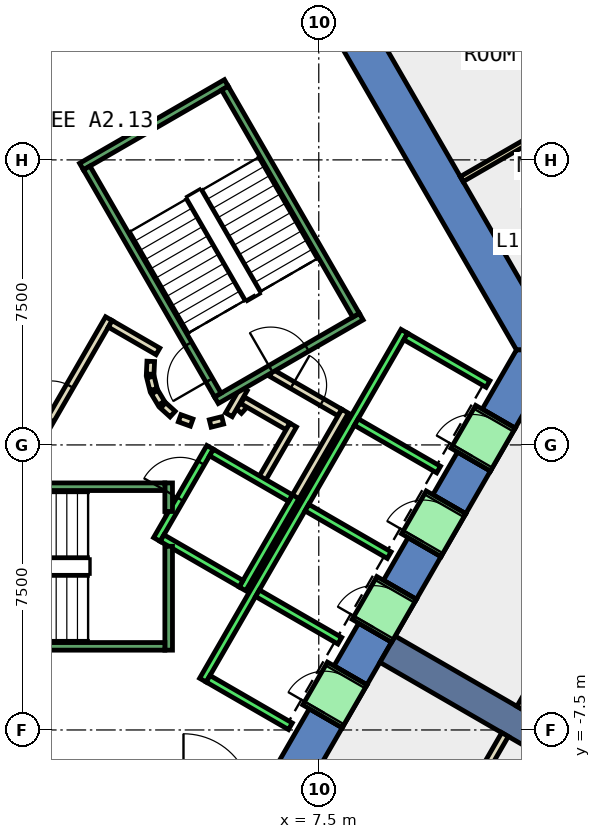
"""IFC4 building model, lengths in metres.
Left out: names, types, materials, properties, quantities, classifications, styles, units other than length and angle.
Written with IfcOpenShell. Run it as: python <this file> out.ifc"""

import sys

from ifc_helpers import new_model, si_unit, direction, frame, frame_2d, origin, place, context, subcontext, project, spatial, polyline, rectangle, outline, extrude, element, fill, save


model = new_model("IFC4")
c1 = context("Model", 3, precision=1e-05, world=origin(), true_north=direction((0.0, 1.0)))
c2 = subcontext(c1, "Body", "Model", "MODEL_VIEW")
j1 = project(units=[si_unit("LENGTHUNIT", "METRE"), si_unit("PLANEANGLEUNIT", "RADIAN")], contexts=[c1])
p1 = place(None, origin())
s1 = spatial("IfcSite", under=j1, at=p1, CompositionType="ELEMENT")
p2 = place(p1, origin())
s2 = spatial("IfcBuilding", under=s1, at=p2, CompositionType="ELEMENT")
p3 = place(p2, frame((0.0, 0.0, 56.0)))
s3 = spatial("IfcBuildingStorey", under=s2, at=p3, CompositionType="ELEMENT", Elevation=56.0)
p4 = place(p3, frame((0.0, 0.0, -0.4)))
e1 = element("IfcWall", 1, at=p4, inside=s3, PredefinedType="SHEAR", context=c2, shape_type="SweptSolid", body=[
    extrude(outline(polyline([(8.517, 11.748), (7.651, 11.248), (12.702, 2.5), (13.856, 2.5), (8.517, 11.748)])), origin(), (0.0, 0.0, 1.0), 4.2),
])
p5 = place(p3, frame((0.0, 0.0, -0.4)))
e2 = element("IfcWall", 2, at=p5, inside=s3, PredefinedType="SHEAR", context=c2, shape_type="SweptSolid", body=[
    extrude(outline(polyline([(8.117, -7.44), (7.252, -6.94), (6.351, -8.5), (6.928, -9.5), (8.117, -7.44)])), origin(), (0.0, 0.0, 1.0), 4.2),
])
p6 = place(p3, frame((0.0, 0.0, -0.4)))
e3 = element("IfcWall", 3, at=p6, inside=s3, PredefinedType="SHEAR", context=c2, shape_type="SweptSolid", body=[
    extrude(outline(polyline([(9.417, -5.189), (8.551, -4.689), (7.902, -5.814), (8.767, -6.314), (9.417, -5.189)])), origin(), (0.0, 0.0, 1.0), 4.2),
])
p7 = place(p3, frame((0.0, 0.0, -0.4)))
e4 = element("IfcWall", 4, at=p7, inside=s3, PredefinedType="SHEAR", context=c2, shape_type="SweptSolid", body=[
    extrude(outline(polyline([(10.717, -2.937), (9.851, -2.437), (9.201, -3.563), (10.067, -4.063), (10.717, -2.937)])), origin(), (0.0, 0.0, 1.0), 4.2),
])
p8 = place(p3, frame((0.0, 0.0, -0.4)))
e5 = element("IfcWall", 5, at=p8, inside=s3, PredefinedType="SHEAR", context=c2, shape_type="SweptSolid", body=[
    extrude(outline(polyline([(12.017, -0.686), (11.151, -0.186), (10.501, -1.311), (11.367, -1.811), (12.017, -0.686)])), origin(), (0.0, 0.0, 1.0), 4.2),
])
p9 = place(p3, frame((0.0, 0.0, -0.4)))
e6 = element("IfcWall", 6, at=p9, inside=s3, PredefinedType="SHEAR", context=c2, shape_type="SweptSolid", body=[
    extrude(outline(polyline([(11.801, 0.94), (12.667, 0.44), (13.856, 2.5), (12.702, 2.5), (11.801, 0.94)])), origin(), (0.0, 0.0, 1.0), 4.2),
])
p10 = place(p3, frame((0.0, 0.0, 3.6)))
e7 = element("IfcWall", 7, at=p10, inside=s3, PredefinedType="SHEAR", context=c2, shape_type="SweptSolid", body=[
    extrude(outline(polyline([(8.767, -6.314), (7.902, -5.814), (7.252, -6.94), (8.117, -7.44), (8.767, -6.314)])), origin(), (0.0, 0.0, 1.0), 0.2),
])
p11 = place(p3, frame((0.0, 0.0, 3.6)))
e8 = element("IfcWall", 8, at=p11, inside=s3, PredefinedType="SHEAR", context=c2, shape_type="SweptSolid", body=[
    extrude(outline(polyline([(10.067, -4.063), (9.201, -3.563), (8.551, -4.689), (9.417, -5.189), (10.067, -4.063)])), origin(), (0.0, 0.0, 1.0), 0.2),
])
p12 = place(p3, frame((0.0, 0.0, 3.6)))
e9 = element("IfcWall", 9, at=p12, inside=s3, PredefinedType="SHEAR", context=c2, shape_type="SweptSolid", body=[
    extrude(outline(polyline([(11.367, -1.811), (10.501, -1.311), (9.851, -2.437), (10.717, -2.937), (11.367, -1.811)])), origin(), (0.0, 0.0, 1.0), 0.2),
])
p13 = place(p3, frame((0.0, 0.0, 3.6)))
e10 = element("IfcWall", 10, at=p13, inside=s3, PredefinedType="SHEAR", context=c2, shape_type="SweptSolid", body=[
    extrude(outline(polyline([(12.667, 0.44), (11.801, 0.94), (11.151, -0.186), (12.017, -0.686), (12.667, 0.44)])), origin(), (0.0, 0.0, 1.0), 0.2),
])
p14 = place(p3, frame((9.31, -5.375, -0.4), z_axis=(0.0, 0.0, 1.0), x_axis=(0.866017533419, -0.500013631625, 0.0)))
e11 = element("IfcWall", 11, at=p14, inside=s3, PredefinedType="SHEAR", context=c2, shape_type="SweptSolid", body=[
    extrude(rectangle(XDim=9.0, YDim=0.8, at=frame_2d((4.5, 0.0))), origin(), (0.0, 0.0, 1.0), 4.2),
])
p15 = place(p3, frame((5.39, 0.898, 0.0), z_axis=(0.0, 0.0, 1.0), x_axis=(0.673828488714, 0.738887791073, 0.0)))
e12 = element("IfcWall", 12, at=p15, inside=s3, PredefinedType="PARTITIONING", context=c2, shape_type="SweptSolid", body=[
    extrude(rectangle(XDim=0.263, YDim=0.2, at=frame_2d((0.131, 0.0))), origin(), (0.0, 0.0, 1.0), 3.8),
])
p16 = place(p3, frame((5.499, 1.172, 0.0), z_axis=(0.0, 0.0, 1.0), x_axis=(0.866333505267, -0.499465972466, 0.0)))
e13 = element("IfcWall", 13, at=p16, inside=s3, PredefinedType="PARTITIONING", context=c2, shape_type="SweptSolid", body=[
    extrude(rectangle(XDim=1.374, YDim=0.2, at=frame_2d((0.687, 0.0))), origin(), (0.0, 0.0, 1.0), 3.8),
])
p17 = place(p3, frame((6.826, 0.522, 0.0), z_axis=(0.0, 0.0, 1.0), x_axis=(-0.500016722714, -0.866015748706, 0.0)))
e14 = element("IfcWall", 14, at=p17, inside=s3, PredefinedType="PARTITIONING", context=c2, shape_type="SweptSolid", body=[
    extrude(rectangle(XDim=1.7, YDim=0.2, at=frame_2d((0.85, 0.0))), origin(), (0.0, 0.0, 1.0), 3.8),
])
p18 = place(p3, frame((6.25, 1.894, 0.0), z_axis=(0.0, 0.0, 1.0), x_axis=(0.866043184279, -0.499969202016, 0.0)))
e15 = element("IfcWall", 15, at=p18, inside=s3, PredefinedType="PARTITIONING", context=c2, shape_type="SweptSolid", body=[
    extrude(rectangle(XDim=2.084, YDim=0.2, at=frame_2d((1.042, 0.0))), origin(), (0.0, 0.0, 1.0), 3.8),
])
p19 = place(p18, frame((0.642, 0.0, 0.0)))
e16 = element("IfcOpeningElement", 16, at=p19, cuts=e15, PredefinedType="OPENING", context=c2, shape_type="SweptSolid", body=[
    extrude(rectangle(XDim=0.9, YDim=2.1, at=frame_2d((0.45, 1.05))), frame((0.0, 0.11, 0.0), z_axis=(0.0, -1.0, 0.0), x_axis=(1.0, 0.0, 0.0)), (0.0, 0.0, 1.0), 0.22),
])
p20 = place(p3, frame((8.192, 0.888, 0.0), z_axis=(0.0, 0.0, 1.0), x_axis=(-0.499940625693, -0.866059680843, 0.0)))
e17 = element("IfcWall", 17, at=p20, inside=s3, PredefinedType="PARTITIONING", context=c2, shape_type="SweptSolid", body=[
    extrude(rectangle(XDim=2.68, YDim=0.2, at=frame_2d((1.34, 0.0))), origin(), (0.0, 0.0, 1.0), 3.8),
])
p21 = place(p3, frame((5.135, 0.793, 0.0), z_axis=(0.0, 0.0, 1.0), x_axis=(0.499526442893, 0.866298639529, 0.0)))
e18 = element("IfcWall", 18, at=p21, inside=s3, PredefinedType="PARTITIONING", context=c2, shape_type="SweptSolid", body=[
    extrude(rectangle(XDim=0.791, YDim=0.2, at=frame_2d((0.396, 0.0))), origin(), (0.0, 0.0, 1.0), 3.8),
])
p22 = place(p3, frame((16.104, 9.79, 0.0), z_axis=(0.0, 0.0, 1.0), x_axis=(-0.866023462144, -0.500003363005, 0.0)))
e19 = element("IfcWall", 19, at=p22, inside=s3, PredefinedType="PARTITIONING", context=c2, shape_type="SweptSolid", body=[
    extrude(rectangle(XDim=5.592, YDim=0.15, at=frame_2d((2.796, 0.0))), origin(), (0.0, 0.0, 1.0), 3.8),
])
p23 = place(p3, frame((-0.52, -1.0, 0.0), z_axis=(0.0, 0.0, 1.0), x_axis=(0.50011622646, 0.865958290007, 0.0)))
e20 = element("IfcWall", 20, at=p23, inside=s3, PredefinedType="PARTITIONING", context=c2, shape_type="SweptSolid", body=[
    extrude(rectangle(XDim=4.991, YDim=0.2, at=frame_2d((2.496, 0.0))), origin(), (0.0, 0.0, 1.0), 3.8),
])
p24 = place(p23, frame((1.945, 0.0, 0.0)))
e21 = element("IfcOpeningElement", 21, at=p24, cuts=e20, PredefinedType="OPENING", context=c2, shape_type="SweptSolid", body=[
    extrude(rectangle(XDim=1.0, YDim=2.1, at=frame_2d((0.5, 1.05))), frame((0.0, 0.11, 0.0), z_axis=(0.0, -1.0, 0.0), x_axis=(1.0, 0.0, 0.0)), (0.0, 0.0, 1.0), 0.22),
])
p25 = place(p3, frame((2.012, 3.186, 0.0), z_axis=(0.0, 0.0, 1.0), x_axis=(0.865891012941, -0.500232699559, 0.0)))
e22 = element("IfcWall", 22, at=p25, inside=s3, PredefinedType="PARTITIONING", context=c2, shape_type="SweptSolid", body=[
    extrude(rectangle(XDim=1.449, YDim=0.2, at=frame_2d((0.725, 0.0))), origin(), (0.0, 0.0, 1.0), 3.8),
])
p26 = place(p3, frame((3.079, 2.199, 0.0), z_axis=(0.0, 0.0, 1.0), x_axis=(-0.047771483479, -0.998858290933, 0.0)))
e23 = element("IfcWall", 23, at=p26, inside=s3, PredefinedType="PARTITIONING", context=c2, shape_type="SweptSolid", body=[
    extrude(rectangle(XDim=0.337, YDim=0.2, at=frame_2d((0.169, 0.0))), origin(), (0.0, 0.0, 1.0), 3.8),
])
p27 = place(p3, frame((3.07, 1.786, 0.0), z_axis=(0.0, 0.0, 1.0), x_axis=(0.242705583207, -0.970099994784, 0.0)))
e24 = element("IfcWall", 24, at=p27, inside=s3, PredefinedType="PARTITIONING", context=c2, shape_type="SweptSolid", body=[
    extrude(rectangle(XDim=0.338, YDim=0.2, at=frame_2d((0.169, 0.0))), origin(), (0.0, 0.0, 1.0), 3.8),
])
for number, where, z_axis, x_axis in (
    (25, (3.182, 1.388, 0.0), (0.0, 0.0, 1.0), (0.512, -0.859, 0.0)),
    (26, (3.404, 1.039, 0.0), (0.0, 0.0, 1.0), (0.74, -0.672, 0.0)),
):
    element("IfcWall", number, at=place(p3, frame(where, z_axis=z_axis, x_axis=x_axis)), inside=s3, PredefinedType="PARTITIONING", context=c2, shape_type="SweptSolid", body=[
        extrude(rectangle(XDim=0.338, YDim=0.2, at=frame_2d((0.169, 0.0))), origin(), (0.0, 0.0, 1.0), 3.8),
    ])
p28 = place(p3, frame((3.838, 0.702, 0.0), z_axis=(0.0, 0.0, 1.0), x_axis=(0.941035081519, -0.338308993895, 0.0)))
e27 = element("IfcWall", 27, at=p28, inside=s3, PredefinedType="PARTITIONING", context=c2, shape_type="SweptSolid", body=[
    extrude(rectangle(XDim=0.337, YDim=0.2, at=frame_2d((0.168, 0.0))), origin(), (0.0, 0.0, 1.0), 3.8),
])
p29 = place(p3, frame((4.644, 0.564, 0.0), z_axis=(0.0, 0.0, 1.0), x_axis=(0.969929076366, 0.243387729394, 0.0)))
e28 = element("IfcWall", 28, at=p29, inside=s3, PredefinedType="PARTITIONING", context=c2, shape_type="SweptSolid", body=[
    extrude(rectangle(XDim=0.337, YDim=0.2, at=frame_2d((0.168, 0.0))), origin(), (0.0, 0.0, 1.0), 3.8),
])
p30 = place(p3, frame((19.257, 4.255, 0.0), z_axis=(0.0, 0.0, 1.0), x_axis=(-0.499978317034, -0.866037922089, 0.0)))
e29 = element("IfcWall", 29, at=p30, inside=s3, PredefinedType="PARTITIONING", context=c2, shape_type="SweptSolid", body=[
    extrude(rectangle(XDim=12.913, YDim=0.2, at=frame_2d((6.456, 0.0))), origin(), (0.0, 0.0, 1.0), 3.8),
])
p31 = place(p3, frame((12.401, -7.621, 0.0), z_axis=(0.0, 0.0, 1.0), x_axis=(-0.499983724212, -0.866034800411, 0.0)))
e30 = element("IfcWall", 30, at=p31, inside=s3, PredefinedType="PARTITIONING", context=c2, shape_type="SweptSolid", body=[
    extrude(rectangle(XDim=9.302, YDim=0.2, at=frame_2d((4.651, 0.0))), origin(), (0.0, 0.0, 1.0), 3.8),
])
p32 = place(p3, frame((3.24, -2.488, 0.0), z_axis=(0.0, 0.0, 1.0), x_axis=(0.49994636267, 0.866056369097, 0.0)))
e31 = element("IfcWall", 31, at=p32, inside=s3, PredefinedType="STANDARD", context=c2, shape_type="SweptSolid", body=[
    extrude(rectangle(XDim=2.8, YDim=0.2, at=frame_2d((1.4, 0.0))), origin(), (0.0, 0.0, 1.0), 3.8),
])
p33 = place(p32, frame((1.225, 0.0, 0.0)))
e32 = element("IfcOpeningElement", 32, at=p33, cuts=e31, PredefinedType="OPENING", context=c2, shape_type="SweptSolid", body=[
    extrude(rectangle(XDim=1.1, YDim=2.1, at=frame_2d((0.55, 1.05))), frame((0.0, 0.11, 0.0), z_axis=(0.0, -1.0, 0.0), x_axis=(1.0, 0.0, 0.0)), (0.0, 0.0, 1.0), 0.22),
])
p34 = place(p3, frame((5.492, -3.788, 0.0), z_axis=(0.0, 0.0, 1.0), x_axis=(0.500011755427, 0.866018616679, 0.0)))
e33 = element("IfcWall", 33, at=p34, inside=s3, PredefinedType="STANDARD", context=c2, shape_type="SweptSolid", body=[
    extrude(rectangle(XDim=2.8, YDim=0.2, at=frame_2d((1.4, 0.0))), origin(), (0.0, 0.0, 1.0), 3.8),
])
p35 = place(p3, frame((3.377, -2.452, 0.0), z_axis=(0.0, 0.0, 1.0), x_axis=(0.865955154139, -0.50012165622, 0.0)))
e34 = element("IfcWall", 34, at=p35, inside=s3, PredefinedType="STANDARD", context=c2, shape_type="SweptSolid", body=[
    extrude(rectangle(XDim=2.4, YDim=0.2, at=frame_2d((1.2, 0.0))), origin(), (0.0, 0.0, 1.0), 3.8),
])
p36 = place(p3, frame((4.677, -0.2, 0.0), z_axis=(0.0, 0.0, 1.0), x_axis=(0.865973769406, -0.500089422704, 0.0)))
e35 = element("IfcWall", 35, at=p36, inside=s3, PredefinedType="STANDARD", context=c2, shape_type="SweptSolid", body=[
    extrude(rectangle(XDim=2.399, YDim=0.2, at=frame_2d((1.2, 0.0))), origin(), (0.0, 0.0, 1.0), 3.8),
])
p37 = place(p3, frame((4.451, -6.19, 0.0), z_axis=(0.0, 0.0, 1.0), x_axis=(0.50000090737, 0.866024879913, 0.0)))
e36 = element("IfcWall", 36, at=p37, inside=s3, PredefinedType="STANDARD", context=c2, shape_type="SweptSolid", body=[
    extrude(rectangle(XDim=10.6, YDim=0.2, at=frame_2d((5.3, 0.0))), origin(), (0.0, 0.0, 1.0), 3.8),
])
for number, where, z_axis, x_axis in (
    (37, (4.588, -6.153, 0.0), (0.0, 0.0, 1.0), (0.866, -0.5, 0.0)),
    (38, (5.888, -3.902, 0.0), (0.0, 0.0, 1.0), (0.866, -0.5, 0.0)),
    (39, (7.188, -1.65, 0.0), (0.0, 0.0, 1.0), (0.866, -0.5, 0.0)),
    (40, (8.488, 0.602, 0.0), (0.0, 0.0, 1.0), (0.866, -0.5, 0.0)),
):
    element("IfcWall", number, at=place(p3, frame(where, z_axis=z_axis, x_axis=x_axis)), inside=s3, PredefinedType="STANDARD", context=c2, shape_type="SweptSolid", body=[
        extrude(rectangle(XDim=2.5, YDim=0.2, at=frame_2d((1.25, 0.0))), origin(), (0.0, 0.0, 1.0), 3.8),
    ])
p38 = place(p3, frame((9.788, 2.853, 0.0), z_axis=(0.0, 0.0, 1.0), x_axis=(0.865998541277, -0.500046524342, 0.0)))
e41 = element("IfcWall", 41, at=p38, inside=s3, PredefinedType="STANDARD", context=c2, shape_type="SweptSolid", body=[
    extrude(rectangle(XDim=2.5, YDim=0.2, at=frame_2d((1.25, 0.0))), origin(), (0.0, 0.0, 1.0), 3.8),
])
p39 = place(p3, frame((7.598, -7.14, 0.0), z_axis=(0.0, 0.0, 1.0), x_axis=(0.500362116554, 0.865816234728, 0.0)))
e42 = element("IfcWall", 42, at=p39, inside=s3, PredefinedType="STANDARD", context=c2, shape_type="SweptSolid", body=[
    extrude(rectangle(XDim=1.299, YDim=1.2, at=frame_2d((0.65, 0.0))), origin(), (0.0, 0.0, 1.0), 2.4),
])
p40 = place(p39, frame((0.1, 0.0, 0.0)))
e43 = element("IfcOpeningElement", 43, at=p40, cuts=e42, PredefinedType="OPENING", context=c2, shape_type="SweptSolid", body=[
    extrude(rectangle(XDim=1.1, YDim=2.3, at=frame_2d((0.55, 1.15))), frame((0.0, 0.61, 0.0), z_axis=(0.0, -1.0, 0.0), x_axis=(1.0, 0.0, 0.0)), (0.0, 0.0, 1.0), 1.22),
])
p41 = place(p3, frame((8.898, -4.889, 0.0), z_axis=(0.0, 0.0, 1.0), x_axis=(0.500036693733, 0.866004217611, 0.0)))
e44 = element("IfcWall", 44, at=p41, inside=s3, PredefinedType="STANDARD", context=c2, shape_type="SweptSolid", body=[
    extrude(rectangle(XDim=1.3, YDim=1.2, at=frame_2d((0.65, 0.0))), origin(), (0.0, 0.0, 1.0), 2.4),
])
p42 = place(p41, frame((0.1, 0.0, 0.0)))
e45 = element("IfcOpeningElement", 45, at=p42, cuts=e44, PredefinedType="OPENING", context=c2, shape_type="SweptSolid", body=[
    extrude(rectangle(XDim=1.1, YDim=2.3, at=frame_2d((0.55, 1.15))), frame((0.0, 0.61, 0.0), z_axis=(0.0, -1.0, 0.0), x_axis=(1.0, 0.0, 0.0)), (0.0, 0.0, 1.0), 1.22),
])
p43 = place(p3, frame((10.198, -2.637, 0.0), z_axis=(0.0, 0.0, 1.0), x_axis=(0.49989585183, 0.866085525409, 0.0)))
e46 = element("IfcWall", 46, at=p43, inside=s3, PredefinedType="STANDARD", context=c2, shape_type="SweptSolid", body=[
    extrude(rectangle(XDim=1.3, YDim=1.2, at=frame_2d((0.65, 0.0))), origin(), (0.0, 0.0, 1.0), 2.4),
])
p44 = place(p43, frame((0.1, 0.0, 0.0)))
e47 = element("IfcOpeningElement", 47, at=p44, cuts=e46, PredefinedType="OPENING", context=c2, shape_type="SweptSolid", body=[
    extrude(rectangle(XDim=1.1, YDim=2.3, at=frame_2d((0.55, 1.15))), frame((0.0, 0.61, 0.0), z_axis=(0.0, -1.0, 0.0), x_axis=(1.0, 0.0, 0.0)), (0.0, 0.0, 1.0), 1.22),
])
p45 = place(p3, frame((11.498, -0.385, 0.0), z_axis=(0.0, 0.0, 1.0), x_axis=(0.500221244143, 0.865897630733, 0.0)))
e48 = element("IfcWall", 48, at=p45, inside=s3, PredefinedType="STANDARD", context=c2, shape_type="SweptSolid", body=[
    extrude(rectangle(XDim=1.299, YDim=1.2, at=frame_2d((0.65, 0.0))), origin(), (0.0, 0.0, 1.0), 2.4),
])
p46 = place(p45, frame((0.1, 0.0, 0.0)))
e49 = element("IfcOpeningElement", 49, at=p46, cuts=e48, PredefinedType="OPENING", context=c2, shape_type="SweptSolid", body=[
    extrude(rectangle(XDim=1.1, YDim=2.3, at=frame_2d((0.55, 1.15))), frame((0.0, 0.61, 0.0), z_axis=(0.0, -1.0, 0.0), x_axis=(1.0, 0.0, 0.0)), (0.0, 0.0, 1.0), 1.22),
])
p47 = place(p3, frame((3.55, -2.667, 0.0), z_axis=(0.0, 0.0, 1.0), x_axis=(0.0, -1.0, 0.0)))
e50 = element("IfcWall", 50, at=p47, inside=s3, PredefinedType="STANDARD", context=c2, shape_type="SweptSolid", body=[
    extrude(rectangle(XDim=2.733, YDim=0.2, at=frame_2d((1.366, 0.0))), origin(), (0.0, 0.0, 1.0), 3.8),
])
p48 = place(p3, frame((3.55, -1.0, 0.0), z_axis=(0.0, 0.0, 1.0), x_axis=(0.0, -1.0, 0.0)))
e51 = element("IfcWall", 51, at=p48, inside=s3, PredefinedType="STANDARD", context=c2, shape_type="SweptSolid", body=[
    extrude(rectangle(XDim=0.751, YDim=0.2, at=frame_2d((0.375, 0.0))), origin(), (0.0, 0.0, 1.0), 3.8),
])
p49 = place(p3, frame((-3.45, -1.1, 0.0), z_axis=(0.0, 0.0, 1.0), x_axis=(1.0, 0.0, 0.0)))
e52 = element("IfcWall", 52, at=p49, inside=s3, PredefinedType="STANDARD", context=c2, shape_type="SweptSolid", body=[
    extrude(rectangle(XDim=6.9, YDim=0.2, at=frame_2d((3.45, 0.0))), origin(), (0.0, 0.0, 1.0), 3.8),
])
p50 = place(p49, frame((0.45, 0.0, 0.0)))
e53 = element("IfcOpeningElement", 53, at=p50, cuts=e52, PredefinedType="OPENING", context=c2, shape_type="SweptSolid", body=[
    extrude(rectangle(XDim=1.1, YDim=2.2, at=frame_2d((0.55, 1.1))), frame((0.0, 0.11, 0.0), z_axis=(0.0, -1.0, 0.0), x_axis=(1.0, 0.0, 0.0)), (0.0, 0.0, 1.0), 0.22),
])
p51 = place(p3, frame((-3.45, -5.3, 0.0), z_axis=(0.0, 0.0, 1.0), x_axis=(1.0, 0.0, 0.0)))
e54 = element("IfcWall", 54, at=p51, inside=s3, PredefinedType="STANDARD", context=c2, shape_type="SweptSolid", body=[
    extrude(rectangle(XDim=6.9, YDim=0.2, at=frame_2d((3.45, 0.0))), origin(), (0.0, 0.0, 1.0), 3.8),
])
p52 = place(p3, frame((4.806, 1.176, 0.0), z_axis=(0.0, 0.0, 1.0), x_axis=(0.866059941101, 0.499940174841, 0.0)))
e55 = element("IfcWall", 55, at=p52, inside=s3, PredefinedType="STANDARD", context=c2, shape_type="SweptSolid", body=[
    extrude(rectangle(XDim=4.4, YDim=0.2, at=frame_2d((2.2, 0.0))), origin(), (0.0, 0.0, 1.0), 3.8),
])
p53 = place(p52, frame((1.65, 0.0, 0.0)))
e56 = element("IfcOpeningElement", 56, at=p53, cuts=e55, PredefinedType="OPENING", context=c2, shape_type="SweptSolid", body=[
    extrude(rectangle(XDim=1.1, YDim=2.2, at=frame_2d((0.55, 1.1))), frame((0.0, 0.11, 0.0), z_axis=(0.0, -1.0, 0.0), x_axis=(1.0, 0.0, 0.0)), (0.0, 0.0, 1.0), 0.22),
])
p54 = place(p3, frame((1.256, 7.324, 0.0), z_axis=(0.0, 0.0, 1.0), x_axis=(0.866046073146, 0.499964197906, 0.0)))
e57 = element("IfcWall", 57, at=p54, inside=s3, PredefinedType="STANDARD", context=c2, shape_type="SweptSolid", body=[
    extrude(rectangle(XDim=4.4, YDim=0.2, at=frame_2d((2.2, 0.0))), origin(), (0.0, 0.0, 1.0), 3.8),
])
p55 = place(p3, frame((4.843, 1.312, 0.0), z_axis=(0.0, 0.0, 1.0), x_axis=(-0.499963383562, 0.866046543262, 0.0)))
e58 = element("IfcWall", 58, at=p55, inside=s3, PredefinedType="STANDARD", context=c2, shape_type="SweptSolid", body=[
    extrude(rectangle(XDim=6.9, YDim=0.2, at=frame_2d((3.45, 0.0))), origin(), (0.0, 0.0, 1.0), 3.8),
])
p56 = place(p55, frame((0.45, 0.0, 0.0)))
e59 = element("IfcOpeningElement", 59, at=p56, cuts=e58, PredefinedType="OPENING", context=c2, shape_type="SweptSolid", body=[
    extrude(rectangle(XDim=1.1, YDim=2.2, at=frame_2d((0.55, 1.1))), frame((0.0, 0.11, 0.0), z_axis=(0.0, -1.0, 0.0), x_axis=(1.0, 0.0, 0.0)), (0.0, 0.0, 1.0), 0.22),
])
p57 = place(p3, frame((8.48, 3.412, 0.0), z_axis=(0.0, 0.0, 1.0), x_axis=(-0.499978703459, 0.866037698999, 0.0)))
e60 = element("IfcWall", 60, at=p57, inside=s3, PredefinedType="STANDARD", context=c2, shape_type="SweptSolid", body=[
    extrude(rectangle(XDim=6.9, YDim=0.2, at=frame_2d((3.45, 0.0))), origin(), (0.0, 0.0, 1.0), 3.8),
])
p58 = place(p24, origin())
e61 = element("IfcDoor", 61, at=p58, inside=s3, OperationType="SINGLE_SWING_LEFT", PredefinedType="DOOR", context=c2, shape_type="SweptSolid", body=[
    extrude(rectangle(XDim=1.0, YDim=2.1, at=frame_2d((0.5, 1.05))), frame((0.0, 0.025, 0.0), z_axis=(0.0, -1.0, 0.0), x_axis=(1.0, 0.0, 0.0)), (0.0, 0.0, 1.0), 0.05),
])
fill(e21, e61)
p59 = place(p19, origin())
e62 = element("IfcDoor", 62, at=p59, inside=s3, OperationType="SINGLE_SWING_LEFT", PredefinedType="DOOR", context=c2, shape_type="SweptSolid", body=[
    extrude(rectangle(XDim=0.9, YDim=2.1, at=frame_2d((0.45, 1.05))), frame((0.0, 0.025, 0.0), z_axis=(0.0, -1.0, 0.0), x_axis=(1.0, 0.0, 0.0)), (0.0, 0.0, 1.0), 0.05),
])
fill(e16, e62)
p60 = place(p40, origin())
e63 = element("IfcDoor", 63, at=p60, inside=s3, OperationType="SLIDING_TO_LEFT", PredefinedType="DOOR", context=c2, shape_type="SweptSolid", body=[
    extrude(rectangle(XDim=1.1, YDim=2.3, at=frame_2d((0.55, 1.15))), frame((0.0, 0.025, 0.0), z_axis=(0.0, -1.0, 0.0), x_axis=(1.0, 0.0, 0.0)), (0.0, 0.0, 1.0), 0.05),
])
fill(e43, e63)
p61 = place(p42, origin())
e64 = element("IfcDoor", 64, at=p61, inside=s3, OperationType="SLIDING_TO_LEFT", PredefinedType="DOOR", context=c2, shape_type="SweptSolid", body=[
    extrude(rectangle(XDim=1.1, YDim=2.3, at=frame_2d((0.55, 1.15))), frame((0.0, 0.025, 0.0), z_axis=(0.0, -1.0, 0.0), x_axis=(1.0, 0.0, 0.0)), (0.0, 0.0, 1.0), 0.05),
])
fill(e45, e64)
p62 = place(p44, origin())
e65 = element("IfcDoor", 65, at=p62, inside=s3, OperationType="SLIDING_TO_LEFT", PredefinedType="DOOR", context=c2, shape_type="SweptSolid", body=[
    extrude(rectangle(XDim=1.1, YDim=2.3, at=frame_2d((0.55, 1.15))), frame((0.0, 0.025, 0.0), z_axis=(0.0, -1.0, 0.0), x_axis=(1.0, 0.0, 0.0)), (0.0, 0.0, 1.0), 0.05),
])
fill(e47, e65)
p63 = place(p46, origin())
e66 = element("IfcDoor", 66, at=p63, inside=s3, OperationType="SLIDING_TO_LEFT", PredefinedType="DOOR", context=c2, shape_type="SweptSolid", body=[
    extrude(rectangle(XDim=1.1, YDim=2.3, at=frame_2d((0.55, 1.15))), frame((0.0, 0.025, 0.0), z_axis=(0.0, -1.0, 0.0), x_axis=(1.0, 0.0, 0.0)), (0.0, 0.0, 1.0), 0.05),
])
fill(e49, e66)
p64 = place(p33, origin())
e67 = element("IfcDoor", 67, at=p64, inside=s3, OperationType="SLIDING_TO_LEFT", PredefinedType="DOOR", context=c2, shape_type="SweptSolid", body=[
    extrude(rectangle(XDim=1.1, YDim=2.1, at=frame_2d((0.55, 1.05))), frame((0.0, 0.025, 0.0), z_axis=(0.0, -1.0, 0.0), x_axis=(1.0, 0.0, 0.0)), (0.0, 0.0, 1.0), 0.05),
])
fill(e32, e67)
p65 = place(p56, origin())
e68 = element("IfcDoor", 68, at=p65, inside=s3, OperationType="SINGLE_SWING_LEFT", PredefinedType="DOOR", context=c2, shape_type="SweptSolid", body=[
    extrude(rectangle(XDim=1.1, YDim=2.2, at=frame_2d((0.55, 1.1))), frame((0.0, 0.025, 0.0), z_axis=(0.0, -1.0, 0.0), x_axis=(1.0, 0.0, 0.0)), (0.0, 0.0, 1.0), 0.05),
])
fill(e59, e68)
p66 = place(p53, origin())
e69 = element("IfcDoor", 69, at=p66, inside=s3, OperationType="SINGLE_SWING_LEFT", PredefinedType="DOOR", context=c2, shape_type="SweptSolid", body=[
    extrude(rectangle(XDim=1.1, YDim=2.2, at=frame_2d((0.55, 1.1))), frame((0.0, 0.025, 0.0), z_axis=(0.0, -1.0, 0.0), x_axis=(1.0, 0.0, 0.0)), (0.0, 0.0, 1.0), 0.05),
])
fill(e56, e69)
save(model, sys.argv[1])
